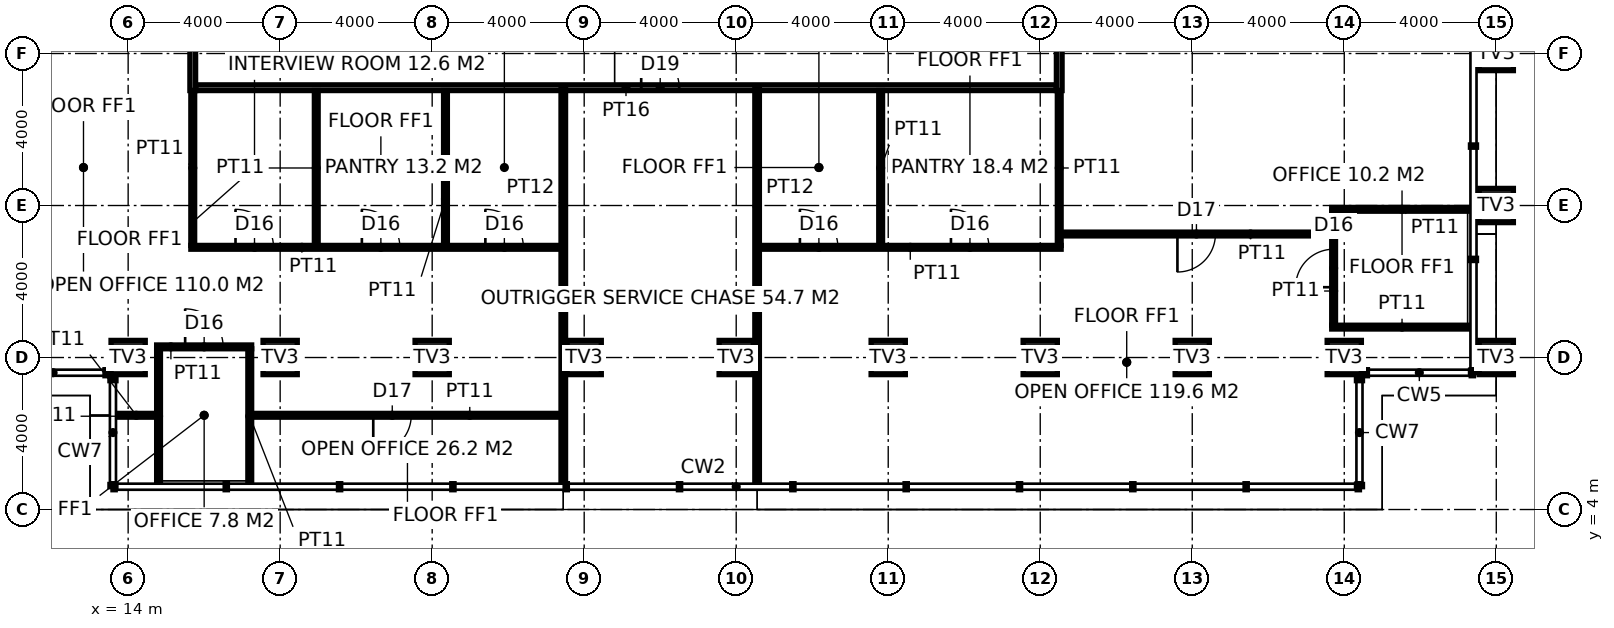
"""IFC4 building model, lengths in metres.
Left out: names, types, materials, properties, quantities, classifications, styles, units other than length and angle.
Written with IfcOpenShell. Run it as: python <this file> out.ifc"""

import sys

from ifc_helpers import new_model, si_unit, direction, frame, frame_2d, origin, origin_2d, place, context, subcontext, project, spatial, rectangle, hollow_rectangle, extrude, element, fill, save


model = new_model("IFC4")
c1 = context("Model", 3, precision=1e-05, world=origin(), true_north=direction((0.0, 1.0)))
c2 = subcontext(c1, "Body", "Model", "MODEL_VIEW")
j1 = project(units=[si_unit("LENGTHUNIT", "METRE"), si_unit("PLANEANGLEUNIT", "RADIAN")], contexts=[c1])
p1 = place(None, origin())
s1 = spatial("IfcSite", under=j1, at=p1, CompositionType="ELEMENT")
p2 = place(p1, origin())
s2 = spatial("IfcBuilding", under=s1, at=p2, CompositionType="ELEMENT")
p3 = place(p2, frame((0.0, 0.0, 238.2)))
s3 = spatial("IfcBuildingStorey", under=s2, at=p3, CompositionType="ELEMENT", Elevation=238.2)
for number, where, z_axis, x_axis in (
    (1, (50.0, 8.0, 0.0), (0.0, 0.0, 1.0), (1.0, 0.0, 0.0)),
    (2, (50.0, 12.0, 0.0), (0.0, 0.0, 1.0), (1.0, 0.0, 0.0)),
    (3, (50.0, 16.0, 0.0), (0.0, 0.0, 1.0), (1.0, 0.0, 0.0)),
    (4, (14.0, 8.0, 0.0), (0.0, 0.0, 1.0), (1.0, 0.0, 0.0)),
    (5, (18.0, 8.0, 0.0), (0.0, 0.0, 1.0), (1.0, 0.0, 0.0)),
    (6, (22.0, 8.0, 0.0), (0.0, 0.0, 1.0), (1.0, 0.0, 0.0)),
    (7, (26.0, 8.0, 0.0), (0.0, 0.0, 1.0), (1.0, 0.0, 0.0)),
    (8, (30.0, 8.0, 0.0), (0.0, 0.0, 1.0), (1.0, 0.0, 0.0)),
    (9, (34.0, 8.0, 0.0), (0.0, 0.0, 1.0), (1.0, 0.0, 0.0)),
    (10, (38.0, 8.0, 0.0), (0.0, 0.0, 1.0), (1.0, 0.0, 0.0)),
    (11, (42.0, 8.0, 0.0), (0.0, 0.0, 1.0), (1.0, 0.0, 0.0)),
    (12, (46.0, 8.0, 0.0), (0.0, 0.0, 1.0), (1.0, 0.0, 0.0)),
):
    element("IfcColumn", number, at=place(p3, frame(where, z_axis=z_axis, x_axis=x_axis)), inside=s3, PredefinedType="USERDEFINED", context=c2, shape_type="SweptSolid", body=[
        extrude(hollow_rectangle(XDim=0.9, YDim=0.9, WallThickness=0.08, at=origin_2d()), origin(), (0.0, 0.0, 1.0), 4.0),
    ])
p4 = place(p3, frame((15.7, 15.025, 0.0), z_axis=(0.0, 0.0, 1.0), x_axis=(0.0, 1.0, 0.0)))
e13 = element("IfcWall", 13, at=p4, inside=s3, PredefinedType="PARTITIONING", context=c2, shape_type="SweptSolid", body=[
    extrude(rectangle(XDim=23.35, YDim=0.15, at=frame_2d((11.675, 0.0))), origin(), (0.0, 0.0, 1.0), 3.85),
])
p5 = place(p4, frame((3.374, 0.0, 0.0)))
e14 = element("IfcOpeningElement", 14, at=p5, cuts=e13, PredefinedType="OPENING", context=c2, shape_type="SweptSolid", body=[
    extrude(rectangle(XDim=1.8, YDim=2.4, at=frame_2d((0.9, 1.2))), frame((0.0, 0.085, 0.0), z_axis=(0.0, -1.0, 0.0), x_axis=(1.0, 0.0, 0.0)), (0.0, 0.0, 1.0), 0.17),
])
p6 = place(p4, frame((17.476, 0.0, 0.0)))
e15 = element("IfcOpeningElement", 15, at=p6, cuts=e13, PredefinedType="OPENING", context=c2, shape_type="SweptSolid", body=[
    extrude(rectangle(XDim=1.8, YDim=2.4, at=frame_2d((0.9, 1.2))), frame((0.0, 0.085, 0.0), z_axis=(0.0, -1.0, 0.0), x_axis=(1.0, 0.0, 0.0)), (0.0, 0.0, 1.0), 0.17),
])
p7 = place(p4, frame((10.475, 0.0, 0.0)))
e16 = element("IfcOpeningElement", 16, at=p7, cuts=e13, PredefinedType="OPENING", context=c2, shape_type="SweptSolid", body=[
    extrude(rectangle(XDim=1.0, YDim=2.2, at=frame_2d((0.5, 1.1))), frame((0.0, 0.085, 0.0), z_axis=(0.0, -1.0, 0.0), x_axis=(1.0, 0.0, 0.0)), (0.0, 0.0, 1.0), 0.17),
])
p8 = place(p3, frame((38.5, 15.025, 0.0), z_axis=(0.0, 0.0, 1.0), x_axis=(0.0, 1.0, 0.0)))
e17 = element("IfcWall", 17, at=p8, inside=s3, PredefinedType="PARTITIONING", context=c2, shape_type="SweptSolid", body=[
    extrude(rectangle(XDim=23.35, YDim=0.15, at=frame_2d((11.675, 0.0))), origin(), (0.0, 0.0, 1.0), 2.65),
])
p9 = place(p8, frame((3.374, 0.0, 0.0)))
e18 = element("IfcOpeningElement", 18, at=p9, cuts=e17, PredefinedType="OPENING", context=c2, shape_type="SweptSolid", body=[
    extrude(rectangle(XDim=1.8, YDim=2.4, at=frame_2d((0.9, 1.2))), frame((0.0, 0.085, 0.0), z_axis=(0.0, -1.0, 0.0), x_axis=(1.0, 0.0, 0.0)), (0.0, 0.0, 1.0), 0.17),
])
p10 = place(p8, frame((17.476, 0.0, 0.0)))
e19 = element("IfcOpeningElement", 19, at=p10, cuts=e17, PredefinedType="OPENING", context=c2, shape_type="SweptSolid", body=[
    extrude(rectangle(XDim=1.8, YDim=2.4, at=frame_2d((0.9, 1.2))), frame((0.0, 0.085, 0.0), z_axis=(0.0, -1.0, 0.0), x_axis=(1.0, 0.0, 0.0)), (0.0, 0.0, 1.0), 0.17),
])
p11 = place(p8, frame((10.475, 0.0, 0.0)))
e20 = element("IfcOpeningElement", 20, at=p11, cuts=e17, PredefinedType="OPENING", context=c2, shape_type="SweptSolid", body=[
    extrude(rectangle(XDim=1.0, YDim=2.2, at=frame_2d((0.5, 1.1))), frame((0.0, 0.085, 0.0), z_axis=(0.0, -1.0, 0.0), x_axis=(1.0, 0.0, 0.0)), (0.0, 0.0, 1.0), 0.17),
])
p12 = place(p3, frame((15.775, 15.1, 0.0), z_axis=(0.0, 0.0, 1.0), x_axis=(1.0, 0.0, 0.0)))
e21 = element("IfcWall", 21, at=p12, inside=s3, PredefinedType="PARTITIONING", context=c2, shape_type="SweptSolid", body=[
    extrude(rectangle(XDim=22.65, YDim=0.15, at=frame_2d((11.325, 0.0))), origin(), (0.0, 0.0, 1.0), 3.85),
])
p13 = place(p12, frame((11.725, 0.0, 0.0)))
e22 = element("IfcOpeningElement", 22, at=p13, cuts=e21, PredefinedType="OPENING", context=c2, shape_type="SweptSolid", body=[
    extrude(rectangle(XDim=1.0, YDim=2.2, at=frame_2d((0.5, 1.1))), frame((0.0, 0.085, 0.0), z_axis=(0.0, -1.0, 0.0), x_axis=(1.0, 0.0, 0.0)), (0.0, 0.0, 1.0), 0.17),
])
for number, where, z_axis, x_axis in (
    (23, (25.45, 4.68, 0.0), (0.0, 0.0, 1.0), (0.0, 1.0, 0.0)),
    (24, (30.55, 4.68, 0.0), (0.0, 0.0, 1.0), (0.0, 1.0, 0.0)),
):
    element("IfcWall", number, at=place(p3, frame(where, z_axis=z_axis, x_axis=x_axis)), inside=s3, PredefinedType="PARTITIONING", context=c2, shape_type="SweptSolid", body=[
        extrude(rectangle(XDim=10.42, YDim=0.12, at=frame_2d((5.21, 0.0))), origin(), (0.0, 0.0, 1.0), 3.85),
    ])
p14 = place(p3, frame((14.75, 8.28, 0.0), z_axis=(0.0, 0.0, 1.0), x_axis=(1.0, 0.0, 0.0)))
e25 = element("IfcWall", 25, at=p14, inside=s3, PredefinedType="PARTITIONING", context=c2, shape_type="SweptSolid", body=[
    extrude(rectangle(XDim=2.5, YDim=0.1, at=frame_2d((1.25, 0.0))), origin(), (0.0, 0.0, 1.0), 3.85),
])
p15 = place(p14, frame((0.75, 0.0, 0.0)))
e26 = element("IfcOpeningElement", 26, at=p15, cuts=e25, PredefinedType="OPENING", context=c2, shape_type="SweptSolid", body=[
    extrude(rectangle(XDim=1.0, YDim=2.2, at=frame_2d((0.5, 1.1))), frame((0.0, 0.06, 0.0), z_axis=(0.0, -1.0, 0.0), x_axis=(1.0, 0.0, 0.0)), (0.0, 0.0, 1.0), 0.12),
])
p16 = place(p3, frame((45.67, 8.8, 0.0), z_axis=(0.0, 0.0, 1.0), x_axis=(1.0, 0.0, 0.0)))
e27 = element("IfcWall", 27, at=p16, inside=s3, PredefinedType="PARTITIONING", context=c2, shape_type="SweptSolid", body=[
    extrude(rectangle(XDim=3.7, YDim=0.1, at=frame_2d((1.85, 0.0))), origin(), (0.0, 0.0, 1.0), 3.85),
])
p17 = place(p3, frame((15.65, 10.9, 0.0), z_axis=(0.0, 0.0, 1.0), x_axis=(1.0, 0.0, 0.0)))
e28 = element("IfcWall", 28, at=p17, inside=s3, PredefinedType="PARTITIONING", context=c2, shape_type="SweptSolid", body=[
    extrude(rectangle(XDim=9.739, YDim=0.1, at=frame_2d((4.87, 0.0))), origin(), (0.0, 0.0, 1.0), 3.85),
])
p18 = place(p17, frame((1.175, 0.0, 0.0)))
e29 = element("IfcOpeningElement", 29, at=p18, cuts=e28, PredefinedType="OPENING", context=c2, shape_type="SweptSolid", body=[
    extrude(rectangle(XDim=1.0, YDim=2.2, at=frame_2d((0.5, 1.1))), frame((0.0, 0.06, 0.0), z_axis=(0.0, -1.0, 0.0), x_axis=(1.0, 0.0, 0.0)), (0.0, 0.0, 1.0), 0.12),
])
p19 = place(p17, frame((4.5, 0.0, 0.0)))
e30 = element("IfcOpeningElement", 30, at=p19, cuts=e28, PredefinedType="OPENING", context=c2, shape_type="SweptSolid", body=[
    extrude(rectangle(XDim=1.0, YDim=2.2, at=frame_2d((0.5, 1.1))), frame((0.0, 0.06, 0.0), z_axis=(0.0, -1.0, 0.0), x_axis=(1.0, 0.0, 0.0)), (0.0, 0.0, 1.0), 0.12),
])
p20 = place(p17, frame((7.75, 0.0, 0.0)))
e31 = element("IfcOpeningElement", 31, at=p20, cuts=e28, PredefinedType="OPENING", context=c2, shape_type="SweptSolid", body=[
    extrude(rectangle(XDim=1.0, YDim=2.2, at=frame_2d((0.5, 1.1))), frame((0.0, 0.06, 0.0), z_axis=(0.0, -1.0, 0.0), x_axis=(1.0, 0.0, 0.0)), (0.0, 0.0, 1.0), 0.12),
])
p21 = place(p3, frame((30.611, 10.9, 0.0), z_axis=(0.0, 0.0, 1.0), x_axis=(1.0, 0.0, 0.0)))
e32 = element("IfcWall", 32, at=p21, inside=s3, PredefinedType="PARTITIONING", context=c2, shape_type="SweptSolid", body=[
    extrude(rectangle(XDim=7.939, YDim=0.1, at=frame_2d((3.969, 0.0))), origin(), (0.0, 0.0, 1.0), 3.85),
])
p22 = place(p21, frame((1.065, 0.0, 0.0)))
e33 = element("IfcOpeningElement", 33, at=p22, cuts=e32, PredefinedType="OPENING", context=c2, shape_type="SweptSolid", body=[
    extrude(rectangle(XDim=1.0, YDim=2.2, at=frame_2d((0.5, 1.1))), frame((0.0, 0.06, 0.0), z_axis=(0.0, -1.0, 0.0), x_axis=(1.0, 0.0, 0.0)), (0.0, 0.0, 1.0), 0.12),
])
p23 = place(p21, frame((5.04, 0.0, 0.0)))
e34 = element("IfcOpeningElement", 34, at=p23, cuts=e32, PredefinedType="OPENING", context=c2, shape_type="SweptSolid", body=[
    extrude(rectangle(XDim=1.0, YDim=2.2, at=frame_2d((0.5, 1.1))), frame((0.0, 0.06, 0.0), z_axis=(0.0, -1.0, 0.0), x_axis=(1.0, 0.0, 0.0)), (0.0, 0.0, 1.0), 0.12),
])
p24 = place(p3, frame((45.67, 11.9, 0.0), z_axis=(0.0, 0.0, 1.0), x_axis=(1.0, 0.0, 0.0)))
e35 = element("IfcWall", 35, at=p24, inside=s3, PredefinedType="PARTITIONING", context=c2, shape_type="SweptSolid", body=[
    extrude(rectangle(XDim=3.7, YDim=0.1, at=frame_2d((1.85, 0.0))), origin(), (0.0, 0.0, 1.0), 3.85),
])
p25 = place(p3, frame((14.8, 4.68, 0.0), z_axis=(0.0, 0.0, 1.0), x_axis=(0.0, 1.0, 0.0)))
e36 = element("IfcWall", 36, at=p25, inside=s3, PredefinedType="PARTITIONING", context=c2, shape_type="SweptSolid", body=[
    extrude(rectangle(XDim=3.55, YDim=0.1, at=frame_2d((1.775, 0.0))), origin(), (0.0, 0.0, 1.0), 3.85),
])
p26 = place(p3, frame((15.7, 10.95, 0.0), z_axis=(0.0, 0.0, 1.0), x_axis=(0.0, 1.0, 0.0)))
e37 = element("IfcWall", 37, at=p26, inside=s3, PredefinedType="PARTITIONING", context=c2, shape_type="SweptSolid", body=[
    extrude(rectangle(XDim=4.075, YDim=0.1, at=frame_2d((2.038, 0.0))), origin(), (0.0, 0.0, 1.0), 3.85),
])
p27 = place(p3, frame((17.2, 4.68, 0.0), z_axis=(0.0, 0.0, 1.0), x_axis=(0.0, 1.0, 0.0)))
e38 = element("IfcWall", 38, at=p27, inside=s3, PredefinedType="PARTITIONING", context=c2, shape_type="SweptSolid", body=[
    extrude(rectangle(XDim=3.55, YDim=0.1, at=frame_2d((1.775, 0.0))), origin(), (0.0, 0.0, 1.0), 3.85),
])
p28 = place(p3, frame((18.95, 10.95, 0.0), z_axis=(0.0, 0.0, 1.0), x_axis=(0.0, 1.0, 0.0)))
e39 = element("IfcWall", 39, at=p28, inside=s3, PredefinedType="PARTITIONING", context=c2, shape_type="SweptSolid", body=[
    extrude(rectangle(XDim=4.075, YDim=0.1, at=frame_2d((2.038, 0.0))), origin(), (0.0, 0.0, 1.0), 3.85),
])
for number, where, z_axis, x_axis in (
    (40, (22.35, 10.95, 0.0), (0.0, 0.0, 1.0), (0.0, 1.0, 0.0)),
    (41, (33.801, 10.95, 0.0), (0.0, 0.0, 1.0), (0.0, 1.0, 0.0)),
):
    element("IfcWall", number, at=place(p3, frame(where, z_axis=z_axis, x_axis=x_axis)), inside=s3, PredefinedType="PARTITIONING", context=c2, shape_type="SweptSolid", body=[
        extrude(rectangle(XDim=4.075, YDim=0.1, at=frame_2d((2.038, 0.0))), origin(), (0.0, 0.0, 1.0), 2.95),
    ])
p29 = place(p3, frame((38.5, 10.95, 0.0), z_axis=(0.0, 0.0, 1.0), x_axis=(0.0, 1.0, 0.0)))
e42 = element("IfcWall", 42, at=p29, inside=s3, PredefinedType="PARTITIONING", context=c2, shape_type="SweptSolid", body=[
    extrude(rectangle(XDim=4.075, YDim=0.1, at=frame_2d((2.038, 0.0))), origin(), (0.0, 0.0, 1.0), 2.65),
])
p30 = place(p3, frame((45.72, 8.85, 0.0), z_axis=(0.0, 0.0, 1.0), x_axis=(0.0, 1.0, 0.0)))
e43 = element("IfcWall", 43, at=p30, inside=s3, PredefinedType="PARTITIONING", context=c2, shape_type="SweptSolid", body=[
    extrude(rectangle(XDim=3.0, YDim=0.1, at=frame_2d((1.5, 0.0))), origin(), (0.0, 0.0, 1.0), 2.65),
])
p31 = place(p30, frame((1.0, 0.0, 0.0)))
e44 = element("IfcOpeningElement", 44, at=p31, cuts=e43, PredefinedType="OPENING", context=c2, shape_type="SweptSolid", body=[
    extrude(rectangle(XDim=1.0, YDim=2.2, at=frame_2d((0.5, 1.1))), frame((0.0, 0.06, 0.0), z_axis=(0.0, -1.0, 0.0), x_axis=(1.0, 0.0, 0.0)), (0.0, 0.0, 1.0), 0.12),
])
p32 = place(p3, frame((14.75, 6.48, 0.0), z_axis=(0.0, 0.0, 1.0), x_axis=(-1.0, 0.0, 0.0)))
e45 = element("IfcWall", 45, at=p32, inside=s3, PredefinedType="PARTITIONING", context=c2, shape_type="SweptSolid", body=[
    extrude(rectangle(XDim=1.07, YDim=0.1, at=frame_2d((0.535, 0.0))), origin(), (0.0, 0.0, 1.0), 3.85),
])
p33 = place(p3, frame((25.449, 6.48, 0.0), z_axis=(0.0, 0.0, 1.0), x_axis=(-1.0, 0.0, 0.0)))
e46 = element("IfcWall", 46, at=p33, inside=s3, PredefinedType="PARTITIONING", context=c2, shape_type="SweptSolid", body=[
    extrude(rectangle(XDim=8.199, YDim=0.1, at=frame_2d((4.1, 0.0))), origin(), (0.0, 0.0, 1.0), 3.85),
])
p34 = place(p33, frame((4.0, 0.0, 0.0)))
e47 = element("IfcOpeningElement", 47, at=p34, cuts=e46, PredefinedType="OPENING", context=c2, shape_type="SweptSolid", body=[
    extrude(rectangle(XDim=1.0, YDim=2.2, at=frame_2d((0.5, 1.1))), frame((0.0, 0.06, 0.0), z_axis=(0.0, -1.0, 0.0), x_axis=(1.0, 0.0, 0.0)), (0.0, 0.0, 1.0), 0.12),
])
p35 = place(p3, frame((45.67, 11.25, 0.0), z_axis=(0.0, 0.0, 1.0), x_axis=(-1.0, 0.0, 0.0)))
e48 = element("IfcWall", 48, at=p35, inside=s3, PredefinedType="PARTITIONING", context=c2, shape_type="SweptSolid", body=[
    extrude(rectangle(XDim=7.12, YDim=0.1, at=frame_2d((3.56, 0.0))), origin(), (0.0, 0.0, 1.0), 3.85),
])
p36 = place(p35, frame((3.06, 0.0, 0.0)))
e49 = element("IfcOpeningElement", 49, at=p36, cuts=e48, PredefinedType="OPENING", context=c2, shape_type="SweptSolid", body=[
    extrude(rectangle(XDim=1.0, YDim=2.2, at=frame_2d((0.5, 1.1))), frame((0.0, 0.06, 0.0), z_axis=(0.0, -1.0, 0.0), x_axis=(1.0, 0.0, 0.0)), (0.0, 0.0, 1.0), 0.12),
])
p37 = place(p13, origin())
e50 = element("IfcDoor", 50, at=p37, inside=s3, OperationType="SINGLE_SWING_LEFT", PredefinedType="DOOR", context=c2, shape_type="SweptSolid", body=[
    extrude(rectangle(XDim=1.0, YDim=2.2, at=frame_2d((0.5, 1.1))), frame((0.0, 0.025, 0.0), z_axis=(0.0, -1.0, 0.0), x_axis=(1.0, 0.0, 0.0)), (0.0, 0.0, 1.0), 0.05),
])
fill(e22, e50)
p38 = place(p18, origin())
e51 = element("IfcDoor", 51, at=p38, inside=s3, OperationType="SINGLE_SWING_LEFT", PredefinedType="DOOR", context=c2, shape_type="SweptSolid", body=[
    extrude(rectangle(XDim=1.0, YDim=2.2, at=frame_2d((0.5, 1.1))), frame((0.0, 0.025, 0.0), z_axis=(0.0, -1.0, 0.0), x_axis=(1.0, 0.0, 0.0)), (0.0, 0.0, 1.0), 0.05),
])
fill(e29, e51)
p39 = place(p19, origin())
e52 = element("IfcDoor", 52, at=p39, inside=s3, OperationType="SINGLE_SWING_LEFT", PredefinedType="DOOR", context=c2, shape_type="SweptSolid", body=[
    extrude(rectangle(XDim=1.0, YDim=2.2, at=frame_2d((0.5, 1.1))), frame((0.0, 0.025, 0.0), z_axis=(0.0, -1.0, 0.0), x_axis=(1.0, 0.0, 0.0)), (0.0, 0.0, 1.0), 0.05),
])
fill(e30, e52)
p40 = place(p20, origin())
e53 = element("IfcDoor", 53, at=p40, inside=s3, OperationType="SINGLE_SWING_LEFT", PredefinedType="DOOR", context=c2, shape_type="SweptSolid", body=[
    extrude(rectangle(XDim=1.0, YDim=2.2, at=frame_2d((0.5, 1.1))), frame((0.0, 0.025, 0.0), z_axis=(0.0, -1.0, 0.0), x_axis=(1.0, 0.0, 0.0)), (0.0, 0.0, 1.0), 0.05),
])
fill(e31, e53)
p41 = place(p22, origin())
e54 = element("IfcDoor", 54, at=p41, inside=s3, OperationType="SINGLE_SWING_LEFT", PredefinedType="DOOR", context=c2, shape_type="SweptSolid", body=[
    extrude(rectangle(XDim=1.0, YDim=2.2, at=frame_2d((0.5, 1.1))), frame((0.0, 0.025, 0.0), z_axis=(0.0, -1.0, 0.0), x_axis=(1.0, 0.0, 0.0)), (0.0, 0.0, 1.0), 0.05),
])
fill(e33, e54)
p42 = place(p23, origin())
e55 = element("IfcDoor", 55, at=p42, inside=s3, OperationType="SINGLE_SWING_LEFT", PredefinedType="DOOR", context=c2, shape_type="SweptSolid", body=[
    extrude(rectangle(XDim=1.0, YDim=2.2, at=frame_2d((0.5, 1.1))), frame((0.0, 0.025, 0.0), z_axis=(0.0, -1.0, 0.0), x_axis=(1.0, 0.0, 0.0)), (0.0, 0.0, 1.0), 0.05),
])
fill(e34, e55)
p43 = place(p15, origin())
e56 = element("IfcDoor", 56, at=p43, inside=s3, OperationType="SINGLE_SWING_LEFT", PredefinedType="DOOR", context=c2, shape_type="SweptSolid", body=[
    extrude(rectangle(XDim=1.0, YDim=2.2, at=frame_2d((0.5, 1.1))), frame((0.0, 0.025, 0.0), z_axis=(0.0, -1.0, 0.0), x_axis=(1.0, 0.0, 0.0)), (0.0, 0.0, 1.0), 0.05),
])
fill(e26, e56)
p44 = place(p31, origin())
e57 = element("IfcDoor", 57, at=p44, inside=s3, OperationType="SINGLE_SWING_LEFT", PredefinedType="DOOR", context=c2, shape_type="SweptSolid", body=[
    extrude(rectangle(XDim=1.0, YDim=2.2, at=frame_2d((0.5, 1.1))), frame((0.0, 0.025, 0.0), z_axis=(0.0, -1.0, 0.0), x_axis=(1.0, 0.0, 0.0)), (0.0, 0.0, 1.0), 0.05),
])
fill(e44, e57)
p45 = place(p34, origin())
e58 = element("IfcDoor", 58, at=p45, inside=s3, OperationType="SINGLE_SWING_RIGHT", PredefinedType="DOOR", context=c2, shape_type="SweptSolid", body=[
    extrude(rectangle(XDim=1.0, YDim=2.2, at=frame_2d((0.5, 1.1))), frame((0.0, 0.025, 0.0), z_axis=(0.0, -1.0, 0.0), x_axis=(1.0, 0.0, 0.0)), (0.0, 0.0, 1.0), 0.05),
])
fill(e47, e58)
p46 = place(p36, origin())
e59 = element("IfcDoor", 59, at=p46, inside=s3, OperationType="SINGLE_SWING_RIGHT", PredefinedType="DOOR", context=c2, shape_type="SweptSolid", body=[
    extrude(rectangle(XDim=1.0, YDim=2.2, at=frame_2d((0.5, 1.1))), frame((0.0, 0.025, 0.0), z_axis=(0.0, -1.0, 0.0), x_axis=(1.0, 0.0, 0.0)), (0.0, 0.0, 1.0), 0.05),
])
fill(e49, e59)
save(model, sys.argv[1])
